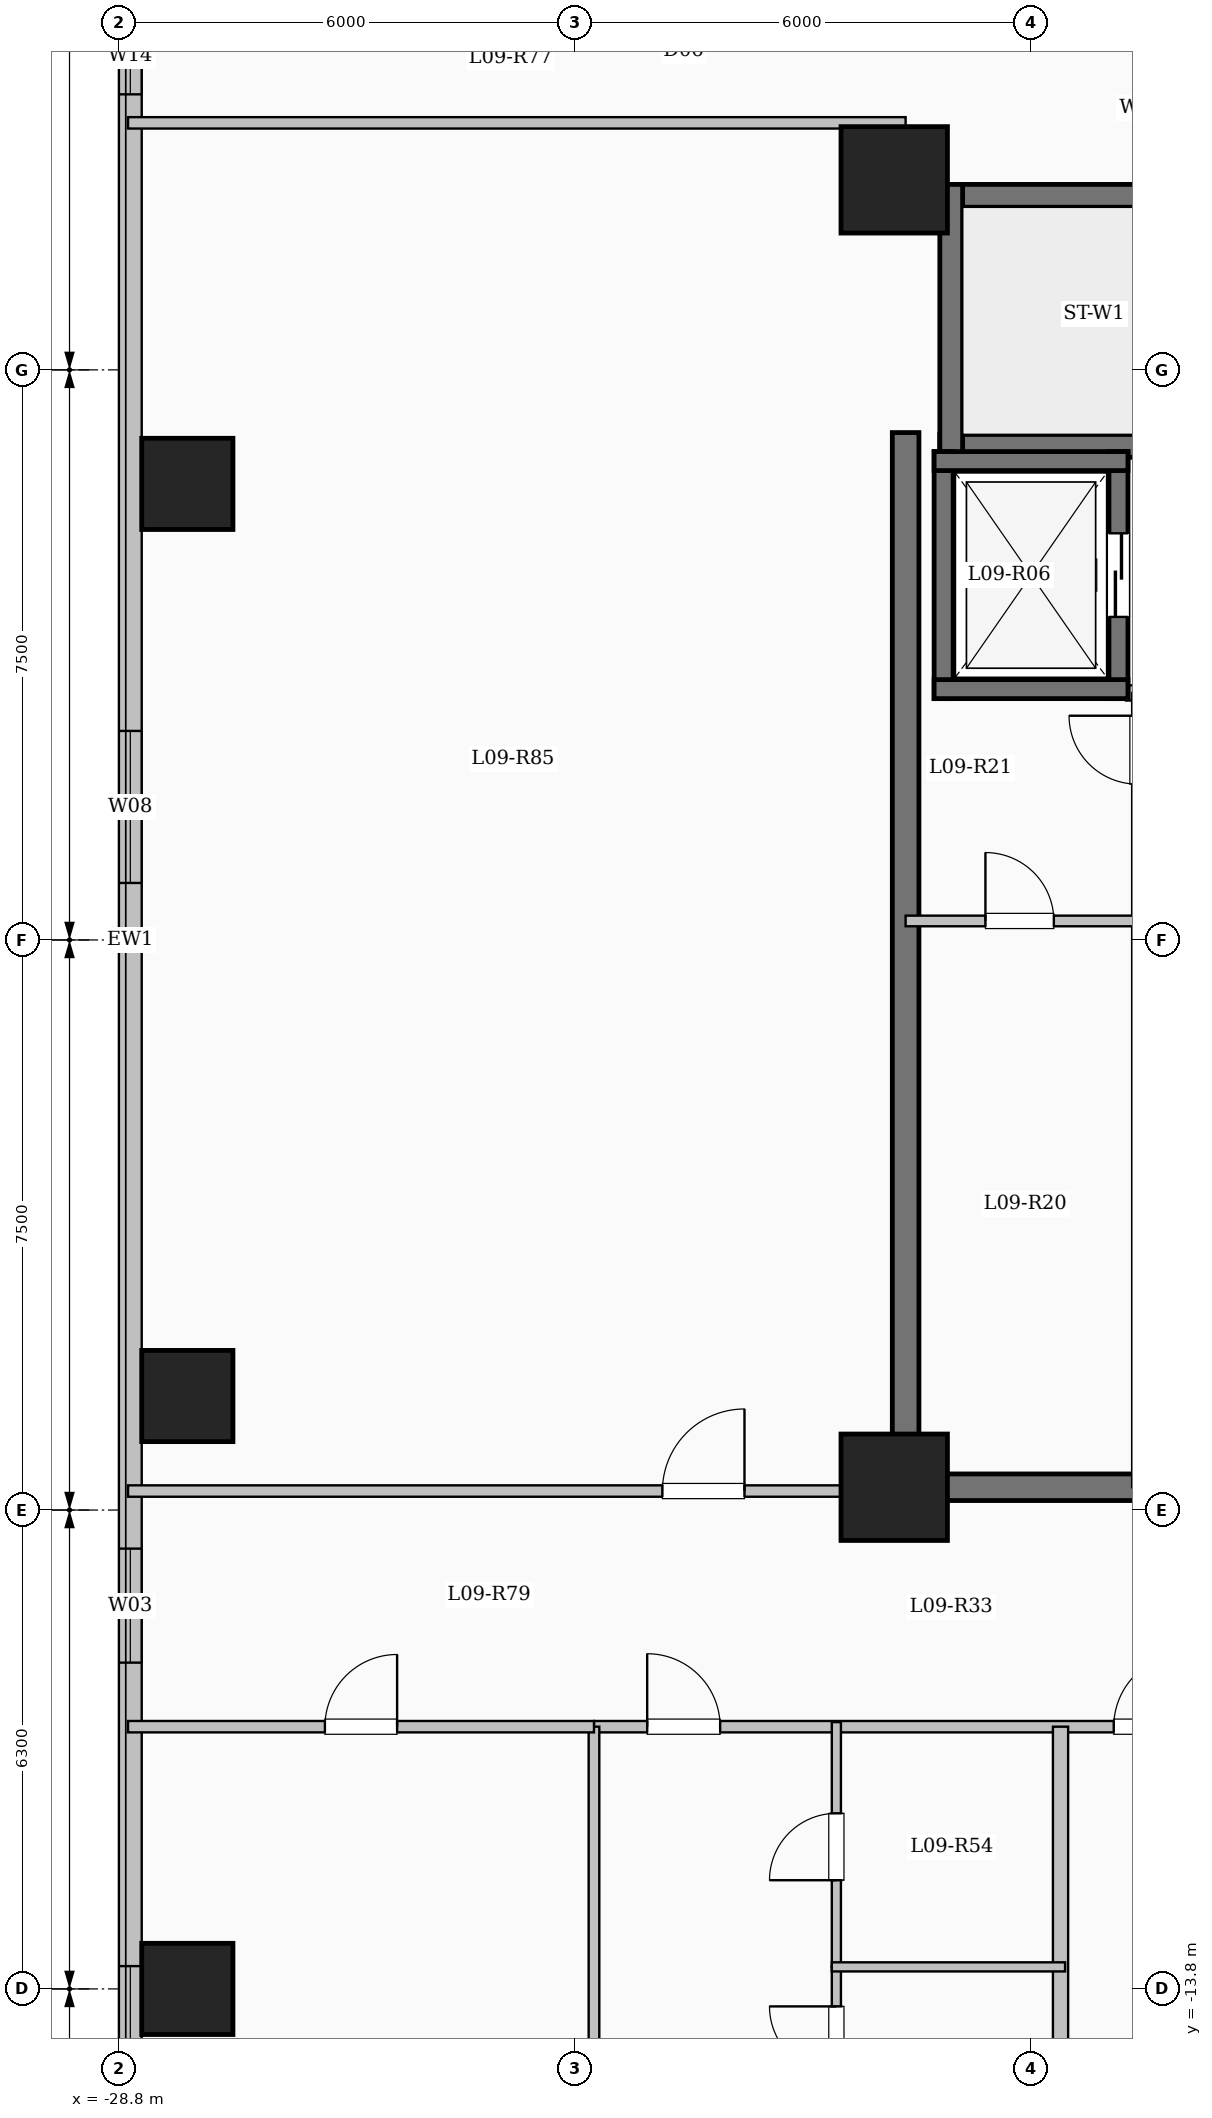
"""IFC4 building model, lengths in metres.
Left out: names, types, materials, properties, quantities, classifications, styles, units other than length and angle.
Written with IfcOpenShell. Run it as: python <this file> out.ifc"""

import sys

from ifc_helpers import new_model, si_unit, direction, frame, frame_2d, origin, origin_2d, place, context, subcontext, project, spatial, rectangle, extrude, element, fill, save


model = new_model("IFC4")
c1 = context("Model", 3, precision=1e-05, world=origin(), true_north=direction((0.0, 1.0)))
c2 = subcontext(c1, "Body", "Model", "MODEL_VIEW")
j1 = project(units=[si_unit("LENGTHUNIT", "METRE"), si_unit("PLANEANGLEUNIT", "RADIAN")], contexts=[c1])
p1 = place(None, origin())
s1 = spatial("IfcSite", under=j1, at=p1, CompositionType="ELEMENT")
p2 = place(p1, origin())
s2 = spatial("IfcBuilding", under=s1, at=p2, CompositionType="ELEMENT")
p3 = place(p2, frame((0.0, 0.0, 37.4)))
s3 = spatial("IfcBuildingStorey", under=s2, at=p3, CompositionType="ELEMENT", Elevation=37.4)
for number, where, z_axis, x_axis in (
    (1, (-18.6, -7.2, 0.0), (0.0, 0.0, 1.0), (1.0, 0.0, 0.0)),
    (2, (-18.6, 10.0, 0.0), (0.0, 0.0, 1.0), (1.0, 0.0, 0.0)),
):
    element("IfcColumn", number, at=place(p3, frame(where, z_axis=z_axis, x_axis=x_axis)), inside=s3, PredefinedType="COLUMN", context=c2, shape_type="SweptSolid", body=[
        extrude(rectangle(XDim=1.4, YDim=1.4, at=origin_2d()), origin(), (0.0, 0.0, 1.0), 3.35),
    ])
for number, where, z_axis, x_axis in (
    (3, (-27.9, -13.8, 0.0), (0.0, 0.0, 1.0), (1.0, 0.0, 0.0)),
    (4, (-27.9, -6.0, 0.0), (0.0, 0.0, 1.0), (1.0, 0.0, 0.0)),
    (5, (-27.9, 6.0, 0.0), (0.0, 0.0, 1.0), (1.0, 0.0, 0.0)),
):
    element("IfcColumn", number, at=place(p3, frame(where, z_axis=z_axis, x_axis=x_axis)), inside=s3, PredefinedType="COLUMN", context=c2, shape_type="SweptSolid", body=[
        extrude(rectangle(XDim=1.2, YDim=1.2, at=origin_2d()), origin(), (0.0, 0.0, 1.0), 3.35),
    ])
p4 = place(p3, frame((-28.65, -19.05, 0.0), z_axis=(0.0, 0.0, 1.0), x_axis=(0.0, 1.0, 0.0)))
e6 = element("IfcWall", 6, at=p4, inside=s3, PredefinedType="SOLIDWALL", context=c2, shape_type="SweptSolid", body=[
    extrude(rectangle(XDim=38.1, YDim=0.3, at=frame_2d((19.05, 0.0))), origin(), (0.0, 0.0, 1.0), 3.1),
])
p5 = place(p4, frame((3.15, 0.0, 0.9)))
e7 = element("IfcOpeningElement", 7, at=p5, cuts=e6, PredefinedType="OPENING", context=c2, shape_type="SweptSolid", body=[
    extrude(rectangle(XDim=2.4, YDim=1.8, at=frame_2d((1.2, 0.9))), frame((0.0, 0.16, 0.0), z_axis=(0.0, -1.0, 0.0), x_axis=(1.0, 0.0, 0.0)), (0.0, 0.0, 1.0), 0.32),
])
p6 = place(p4, frame((9.542, 0.0, 0.9)))
e8 = element("IfcOpeningElement", 8, at=p6, cuts=e6, PredefinedType="OPENING", context=c2, shape_type="SweptSolid", body=[
    extrude(rectangle(XDim=1.5, YDim=1.65, at=frame_2d((0.75, 0.825))), frame((0.0, 0.16, 0.0), z_axis=(0.0, -1.0, 0.0), x_axis=(1.0, 0.0, 0.0)), (0.0, 0.0, 1.0), 0.32),
])
p7 = place(p4, frame((19.8, 0.0, 0.9)))
e9 = element("IfcOpeningElement", 9, at=p7, cuts=e6, PredefinedType="OPENING", context=c2, shape_type="SweptSolid", body=[
    extrude(rectangle(XDim=2.0, YDim=1.7, at=frame_2d((1.0, 0.85))), frame((0.0, 0.16, 0.0), z_axis=(0.0, -1.0, 0.0), x_axis=(1.0, 0.0, 0.0)), (0.0, 0.0, 1.0), 0.32),
])
p8 = place(p4, frame((30.175, 0.0, 0.95)))
e10 = element("IfcOpeningElement", 10, at=p8, cuts=e6, PredefinedType="OPENING", context=c2, shape_type="SweptSolid", body=[
    extrude(rectangle(XDim=1.0, YDim=1.5, at=frame_2d((0.5, 0.75))), frame((0.0, 0.16, 0.0), z_axis=(0.0, -1.0, 0.0), x_axis=(1.0, 0.0, 0.0)), (0.0, 0.0, 1.0), 0.32),
])
p9 = place(p4, frame((33.85, 0.0, 0.9)))
e11 = element("IfcOpeningElement", 11, at=p9, cuts=e6, PredefinedType="OPENING", context=c2, shape_type="SweptSolid", body=[
    extrude(rectangle(XDim=2.0, YDim=1.7, at=frame_2d((1.0, 0.85))), frame((0.0, 0.16, 0.0), z_axis=(0.0, -1.0, 0.0), x_axis=(1.0, 0.0, 0.0)), (0.0, 0.0, 1.0), 0.32),
])
p10 = place(p3, frame((-18.0, 9.79, 0.0), z_axis=(0.0, 0.0, 1.0), x_axis=(1.0, 0.0, 0.0)))
e12 = element("IfcWall", 12, at=p10, inside=s3, PredefinedType="SHEAR", context=c2, shape_type="SweptSolid", body=[
    extrude(rectangle(XDim=8.0, YDim=0.3, at=frame_2d((4.0, 0.0))), origin(), (0.0, 0.0, 1.0), 3.35),
])
p11 = place(p3, frame((-18.0, 6.5, 0.0), z_axis=(0.0, 0.0, 1.0), x_axis=(1.0, 0.0, 0.0)))
e13 = element("IfcWall", 13, at=p11, inside=s3, PredefinedType="SHEAR", context=c2, shape_type="SweptSolid", body=[
    extrude(rectangle(XDim=8.0, YDim=0.3, at=frame_2d((4.0, 0.0))), origin(), (0.0, 0.0, 1.0), 3.35),
])
p12 = place(p11, frame((6.45, 0.0, 0.0)))
e14 = element("IfcOpeningElement", 14, at=p12, cuts=e13, PredefinedType="OPENING", context=c2, shape_type="SweptSolid", body=[
    extrude(rectangle(XDim=1.0, YDim=2.15, at=frame_2d((0.5, 1.075))), frame((0.0, 0.16, 0.0), z_axis=(0.0, -1.0, 0.0), x_axis=(1.0, 0.0, 0.0)), (0.0, 0.0, 1.0), 0.32),
])
p13 = place(p3, frame((-17.85, 6.35, 0.0), z_axis=(0.0, 0.0, 1.0), x_axis=(0.0, 1.0, 0.0)))
e15 = element("IfcWall", 15, at=p13, inside=s3, PredefinedType="SHEAR", context=c2, shape_type="SweptSolid", body=[
    extrude(rectangle(XDim=3.59, YDim=0.3, at=frame_2d((1.795, 0.0))), origin(), (0.0, 0.0, 1.0), 3.35),
])
p14 = place(p3, frame((-15.55, 3.25, 0.0), z_axis=(0.0, 0.0, 1.0), x_axis=(1.0, 0.0, 0.0)))
e16 = element("IfcWall", 16, at=p14, inside=s3, PredefinedType="SOLIDWALL", context=c2, shape_type="SweptSolid", body=[
    extrude(rectangle(XDim=5.4, YDim=0.2, at=frame_2d((2.7, 0.0))), origin(), (0.0, 0.0, 1.0), 3.1),
])
p15 = place(p3, frame((-17.95, 3.175, 0.0), z_axis=(0.0, 0.0, 1.0), x_axis=(0.0, 1.0, 0.0)))
e17 = element("IfcWall", 17, at=p15, inside=s3, PredefinedType="SHEAR", context=c2, shape_type="SweptSolid", body=[
    extrude(rectangle(XDim=3.25, YDim=0.25, at=frame_2d((1.625, 0.0))), origin(), (0.0, 0.0, 1.0), 3.35),
])
p16 = place(p3, frame((-15.65, 3.175, 0.0), z_axis=(0.0, 0.0, 1.0), x_axis=(0.0, 1.0, 0.0)))
e18 = element("IfcWall", 18, at=p16, inside=s3, PredefinedType="SHEAR", context=c2, shape_type="SweptSolid", body=[
    extrude(rectangle(XDim=3.25, YDim=0.25, at=frame_2d((1.625, 0.0))), origin(), (0.0, 0.0, 1.0), 3.35),
])
p17 = place(p16, frame((1.075, 0.0, 0.0)))
e19 = element("IfcOpeningElement", 19, at=p17, cuts=e18, PredefinedType="OPENING", context=c2, shape_type="SweptSolid", body=[
    extrude(rectangle(XDim=1.1, YDim=2.15, at=frame_2d((0.55, 1.075))), frame((0.0, 0.135, 0.0), z_axis=(0.0, -1.0, 0.0), x_axis=(1.0, 0.0, 0.0)), (0.0, 0.0, 1.0), 0.27),
])
for number, where, z_axis, x_axis in (
    (20, (-18.075, 3.3, 0.0), (0.0, 0.0, 1.0), (1.0, 0.0, 0.0)),
    (21, (-18.075, 6.3, 0.0), (0.0, 0.0, 1.0), (1.0, 0.0, 0.0)),
):
    element("IfcWall", number, at=place(p3, frame(where, z_axis=z_axis, x_axis=x_axis)), inside=s3, PredefinedType="SHEAR", context=c2, shape_type="SweptSolid", body=[
        extrude(rectangle(XDim=2.55, YDim=0.25, at=frame_2d((1.275, 0.0))), origin(), (0.0, 0.0, 1.0), 3.35),
    ])
p18 = place(p3, frame((-18.45, -7.375, 0.0), z_axis=(0.0, 0.0, 1.0), x_axis=(0.0, 1.0, 0.0)))
e22 = element("IfcWall", 22, at=p18, inside=s3, PredefinedType="SHEAR", context=c2, shape_type="SweptSolid", body=[
    extrude(rectangle(XDim=14.05, YDim=0.35, at=frame_2d((7.025, 0.0))), origin(), (0.0, 0.0, 1.0), 3.35),
])
p19 = place(p3, frame((-18.625, -7.2, 0.0), z_axis=(0.0, 0.0, 1.0), x_axis=(1.0, 0.0, 0.0)))
e23 = element("IfcWall", 23, at=p19, inside=s3, PredefinedType="SHEAR", context=c2, shape_type="SweptSolid", body=[
    extrude(rectangle(XDim=8.55, YDim=0.35, at=frame_2d((4.275, 0.0))), origin(), (0.0, 0.0, 1.0), 3.35),
])
p20 = place(p3, frame((-18.45, 0.25, 0.0), z_axis=(0.0, 0.0, 1.0), x_axis=(1.0, 0.0, 0.0)))
e24 = element("IfcWall", 24, at=p20, inside=s3, PredefinedType="PARTITIONING", context=c2, shape_type="SweptSolid", body=[
    extrude(rectangle(XDim=3.05, YDim=0.14, at=frame_2d((1.525, 0.0))), origin(), (0.0, 0.0, 1.0), 3.1),
])
p21 = place(p20, frame((1.05, 0.0, 0.0)))
e25 = element("IfcOpeningElement", 25, at=p21, cuts=e24, PredefinedType="OPENING", context=c2, shape_type="SweptSolid", body=[
    extrude(rectangle(XDim=0.9, YDim=2.08, at=frame_2d((0.45, 1.04))), frame((0.0, 0.08, 0.0), z_axis=(0.0, -1.0, 0.0), x_axis=(1.0, 0.0, 0.0)), (0.0, 0.0, 1.0), 0.16),
])
p22 = place(p3, frame((-22.55, -10.35, 0.0), z_axis=(0.0, 0.0, 1.0), x_axis=(1.0, 0.0, 0.0)))
e26 = element("IfcWall", 26, at=p22, inside=s3, PredefinedType="PARTITIONING", context=c2, shape_type="SweptSolid", body=[
    extrude(rectangle(XDim=14.0, YDim=0.15, at=frame_2d((7.0, 0.0))), origin(), (0.0, 0.0, 1.0), 3.1),
])
p23 = place(p22, frame((0.7, 0.0, 0.0)))
e27 = element("IfcOpeningElement", 27, at=p23, cuts=e26, PredefinedType="OPENING", context=c2, shape_type="SweptSolid", body=[
    extrude(rectangle(XDim=0.96, YDim=2.15, at=frame_2d((0.48, 1.075))), frame((0.0, 0.085, 0.0), z_axis=(0.0, -1.0, 0.0), x_axis=(1.0, 0.0, 0.0)), (0.0, 0.0, 1.0), 0.17),
])
p24 = place(p22, frame((6.838, 0.0, 0.0)))
e28 = element("IfcOpeningElement", 28, at=p24, cuts=e26, PredefinedType="OPENING", context=c2, shape_type="SweptSolid", body=[
    extrude(rectangle(XDim=0.96, YDim=2.15, at=frame_2d((0.48, 1.075))), frame((0.0, 0.085, 0.0), z_axis=(0.0, -1.0, 0.0), x_axis=(1.0, 0.0, 0.0)), (0.0, 0.0, 1.0), 0.17),
])
p25 = place(p3, frame((-16.412, -23.6, 0.0), z_axis=(0.0, 0.0, 1.0), x_axis=(0.0, 1.0, 0.0)))
e29 = element("IfcWall", 29, at=p25, inside=s3, PredefinedType="SOLIDWALL", context=c2, shape_type="SweptSolid", body=[
    extrude(rectangle(XDim=13.25, YDim=0.2, at=frame_2d((6.625, 0.0))), origin(), (0.0, 0.0, 1.0), 3.1),
])
p26 = place(p3, frame((-19.361, -23.6, 0.0), z_axis=(0.0, 0.0, 1.0), x_axis=(0.0, 1.0, 0.0)))
e30 = element("IfcWall", 30, at=p26, inside=s3, PredefinedType="PARTITIONING", context=c2, shape_type="SweptSolid", body=[
    extrude(rectangle(XDim=10.09, YDim=0.12, at=frame_2d((5.045, 0.0))), origin(), (0.0, 0.0, 1.0), 3.1),
])
p27 = place(p26, frame((8.69, 0.0, 0.0)))
e31 = element("IfcOpeningElement", 31, at=p27, cuts=e30, PredefinedType="OPENING", context=c2, shape_type="SweptSolid", body=[
    extrude(rectangle(XDim=0.88, YDim=2.1, at=frame_2d((0.44, 1.05))), frame((0.0, 0.07, 0.0), z_axis=(0.0, -1.0, 0.0), x_axis=(1.0, 0.0, 0.0)), (0.0, 0.0, 1.0), 0.14),
])
p28 = place(p3, frame((-19.361, -13.51, 0.0), z_axis=(0.0, 0.0, 1.0), x_axis=(0.0, 1.0, 0.0)))
e32 = element("IfcWall", 32, at=p28, inside=s3, PredefinedType="PARTITIONING", context=c2, shape_type="SweptSolid", body=[
    extrude(rectangle(XDim=3.22, YDim=0.12, at=frame_2d((1.61, 0.0))), origin(), (0.0, 0.0, 1.0), 3.1),
])
p29 = place(p28, frame((1.14, 0.0, 0.0)))
e33 = element("IfcOpeningElement", 33, at=p29, cuts=e32, PredefinedType="OPENING", context=c2, shape_type="SweptSolid", body=[
    extrude(rectangle(XDim=0.88, YDim=2.1, at=frame_2d((0.44, 1.05))), frame((0.0, 0.07, 0.0), z_axis=(0.0, -1.0, 0.0), x_axis=(1.0, 0.0, 0.0)), (0.0, 0.0, 1.0), 0.14),
])
p30 = place(p3, frame((-19.421, -13.51, 0.0), z_axis=(0.0, 0.0, 1.0), x_axis=(1.0, 0.0, 0.0)))
e34 = element("IfcWall", 34, at=p30, inside=s3, PredefinedType="PARTITIONING", context=c2, shape_type="SweptSolid", body=[
    extrude(rectangle(XDim=3.069, YDim=0.12, at=frame_2d((1.534, 0.0))), origin(), (0.0, 0.0, 1.0), 3.1),
])
p31 = place(p3, frame((-28.68, -7.25, 0.0), z_axis=(0.0, 0.0, 1.0), x_axis=(1.0, 0.0, 0.0)))
e35 = element("IfcWall", 35, at=p31, inside=s3, PredefinedType="PARTITIONING", context=c2, shape_type="SweptSolid", body=[
    extrude(rectangle(XDim=10.23, YDim=0.15, at=frame_2d((5.115, 0.0))), origin(), (0.0, 0.0, 1.0), 3.1),
])
p32 = place(p31, frame((7.03, 0.0, 0.0)))
e36 = element("IfcOpeningElement", 36, at=p32, cuts=e35, PredefinedType="OPENING", context=c2, shape_type="SweptSolid", body=[
    extrude(rectangle(XDim=1.08, YDim=2.15, at=frame_2d((0.54, 1.075))), frame((0.0, 0.085, 0.0), z_axis=(0.0, -1.0, 0.0), x_axis=(1.0, 0.0, 0.0)), (0.0, 0.0, 1.0), 0.17),
])
p33 = place(p3, frame((-28.68, 10.75, 0.0), z_axis=(0.0, 0.0, 1.0), x_axis=(1.0, 0.0, 0.0)))
e37 = element("IfcWall", 37, at=p33, inside=s3, PredefinedType="PARTITIONING", context=c2, shape_type="SweptSolid", body=[
    extrude(rectangle(XDim=10.23, YDim=0.15, at=frame_2d((5.115, 0.0))), origin(), (0.0, 0.0, 1.0), 3.1),
])
p34 = place(p3, frame((-22.55, -19.05, 0.0), z_axis=(0.0, 0.0, 1.0), x_axis=(0.0, 1.0, 0.0)))
e38 = element("IfcWall", 38, at=p34, inside=s3, PredefinedType="PARTITIONING", context=c2, shape_type="SweptSolid", body=[
    extrude(rectangle(XDim=8.7, YDim=0.14, at=frame_2d((4.35, 0.0))), origin(), (0.0, 0.0, 1.0), 3.1),
])
p35 = place(p3, frame((-28.68, -10.35, 0.0), z_axis=(0.0, 0.0, 1.0), x_axis=(1.0, 0.0, 0.0)))
e39 = element("IfcWall", 39, at=p35, inside=s3, PredefinedType="PARTITIONING", context=c2, shape_type="SweptSolid", body=[
    extrude(rectangle(XDim=6.13, YDim=0.15, at=frame_2d((3.065, 0.0))), origin(), (0.0, 0.0, 1.0), 3.1),
])
p36 = place(p35, frame((2.59, 0.0, 0.0)))
e40 = element("IfcOpeningElement", 40, at=p36, cuts=e39, PredefinedType="OPENING", context=c2, shape_type="SweptSolid", body=[
    extrude(rectangle(XDim=0.95, YDim=2.15, at=frame_2d((0.475, 1.075))), frame((0.0, 0.085, 0.0), z_axis=(0.0, -1.0, 0.0), x_axis=(1.0, 0.0, 0.0)), (0.0, 0.0, 1.0), 0.17),
])
p37 = place(p5, origin())
e41 = element("IfcWindow", 41, at=p37, inside=s3, PartitioningType="SINGLE_PANEL", PredefinedType="WINDOW", context=c2, shape_type="SweptSolid", body=[
    extrude(rectangle(XDim=2.4, YDim=1.8, at=frame_2d((1.2, 0.9))), frame((0.0, 0.03, 0.0), z_axis=(0.0, -1.0, 0.0), x_axis=(1.0, 0.0, 0.0)), (0.0, 0.0, 1.0), 0.06),
])
fill(e7, e41)
p38 = place(p6, origin())
e42 = element("IfcWindow", 42, at=p38, inside=s3, PartitioningType="SINGLE_PANEL", PredefinedType="WINDOW", context=c2, shape_type="SweptSolid", body=[
    extrude(rectangle(XDim=1.5, YDim=1.65, at=frame_2d((0.75, 0.825))), frame((0.0, 0.03, 0.0), z_axis=(0.0, -1.0, 0.0), x_axis=(1.0, 0.0, 0.0)), (0.0, 0.0, 1.0), 0.06),
])
fill(e8, e42)
p39 = place(p7, origin())
e43 = element("IfcWindow", 43, at=p39, inside=s3, PartitioningType="SINGLE_PANEL", PredefinedType="WINDOW", context=c2, shape_type="SweptSolid", body=[
    extrude(rectangle(XDim=2.0, YDim=1.7, at=frame_2d((1.0, 0.85))), frame((0.0, 0.03, 0.0), z_axis=(0.0, -1.0, 0.0), x_axis=(1.0, 0.0, 0.0)), (0.0, 0.0, 1.0), 0.06),
])
fill(e9, e43)
p40 = place(p8, origin())
e44 = element("IfcWindow", 44, at=p40, inside=s3, PartitioningType="SINGLE_PANEL", PredefinedType="WINDOW", context=c2, shape_type="SweptSolid", body=[
    extrude(rectangle(XDim=1.0, YDim=1.5, at=frame_2d((0.5, 0.75))), frame((0.0, 0.03, 0.0), z_axis=(0.0, -1.0, 0.0), x_axis=(1.0, 0.0, 0.0)), (0.0, 0.0, 1.0), 0.06),
])
fill(e10, e44)
p41 = place(p17, origin())
e45 = element("IfcDoor", 45, at=p41, inside=s3, OperationType="SLIDING_TO_LEFT", PredefinedType="DOOR", context=c2, shape_type="SweptSolid", body=[
    extrude(rectangle(XDim=1.1, YDim=2.15, at=frame_2d((0.55, 1.075))), frame((0.0, 0.025, 0.0), z_axis=(0.0, -1.0, 0.0), x_axis=(1.0, 0.0, 0.0)), (0.0, 0.0, 1.0), 0.05),
])
fill(e19, e45)
p42 = place(p21, origin())
e46 = element("IfcDoor", 46, at=p42, inside=s3, OperationType="SINGLE_SWING_LEFT", PredefinedType="DOOR", context=c2, shape_type="SweptSolid", body=[
    extrude(rectangle(XDim=0.9, YDim=2.08, at=frame_2d((0.45, 1.04))), frame((0.0, 0.025, 0.0), z_axis=(0.0, -1.0, 0.0), x_axis=(1.0, 0.0, 0.0)), (0.0, 0.0, 1.0), 0.05),
])
fill(e25, e46)
p43 = place(p23, origin())
e47 = element("IfcDoor", 47, at=p43, inside=s3, OperationType="SINGLE_SWING_LEFT", PredefinedType="DOOR", context=c2, shape_type="SweptSolid", body=[
    extrude(rectangle(XDim=0.96, YDim=2.15, at=frame_2d((0.48, 1.075))), frame((0.0, 0.025, 0.0), z_axis=(0.0, -1.0, 0.0), x_axis=(1.0, 0.0, 0.0)), (0.0, 0.0, 1.0), 0.05),
])
fill(e27, e47)
p44 = place(p27, origin())
e48 = element("IfcDoor", 48, at=p44, inside=s3, OperationType="SINGLE_SWING_RIGHT", PredefinedType="DOOR", context=c2, shape_type="SweptSolid", body=[
    extrude(rectangle(XDim=0.88, YDim=2.1, at=frame_2d((0.44, 1.05))), frame((0.0, 0.025, 0.0), z_axis=(0.0, -1.0, 0.0), x_axis=(1.0, 0.0, 0.0)), (0.0, 0.0, 1.0), 0.05),
])
fill(e31, e48)
p45 = place(p29, origin())
e49 = element("IfcDoor", 49, at=p45, inside=s3, OperationType="SINGLE_SWING_LEFT", PredefinedType="DOOR", context=c2, shape_type="SweptSolid", body=[
    extrude(rectangle(XDim=0.88, YDim=2.1, at=frame_2d((0.44, 1.05))), frame((0.0, 0.025, 0.0), z_axis=(0.0, -1.0, 0.0), x_axis=(1.0, 0.0, 0.0)), (0.0, 0.0, 1.0), 0.05),
])
fill(e33, e49)
p46 = place(p24, origin())
e50 = element("IfcDoor", 50, at=p46, inside=s3, OperationType="SINGLE_SWING_RIGHT", PredefinedType="DOOR", context=c2, shape_type="SweptSolid", body=[
    extrude(rectangle(XDim=0.96, YDim=2.15, at=frame_2d((0.48, 1.075))), frame((0.0, 0.025, 0.0), z_axis=(0.0, -1.0, 0.0), x_axis=(1.0, 0.0, 0.0)), (0.0, 0.0, 1.0), 0.05),
])
fill(e28, e50)
p47 = place(p36, origin())
e51 = element("IfcDoor", 51, at=p47, inside=s3, OperationType="SINGLE_SWING_RIGHT", PredefinedType="DOOR", context=c2, shape_type="SweptSolid", body=[
    extrude(rectangle(XDim=0.95, YDim=2.15, at=frame_2d((0.475, 1.075))), frame((0.0, 0.025, 0.0), z_axis=(0.0, -1.0, 0.0), x_axis=(1.0, 0.0, 0.0)), (0.0, 0.0, 1.0), 0.05),
])
fill(e40, e51)
p48 = place(p32, origin())
e52 = element("IfcDoor", 52, at=p48, inside=s3, OperationType="SINGLE_SWING_RIGHT", PredefinedType="DOOR", context=c2, shape_type="SweptSolid", body=[
    extrude(rectangle(XDim=1.08, YDim=2.15, at=frame_2d((0.54, 1.075))), frame((0.0, 0.025, 0.0), z_axis=(0.0, -1.0, 0.0), x_axis=(1.0, 0.0, 0.0)), (0.0, 0.0, 1.0), 0.05),
])
fill(e36, e52)
save(model, sys.argv[1])
